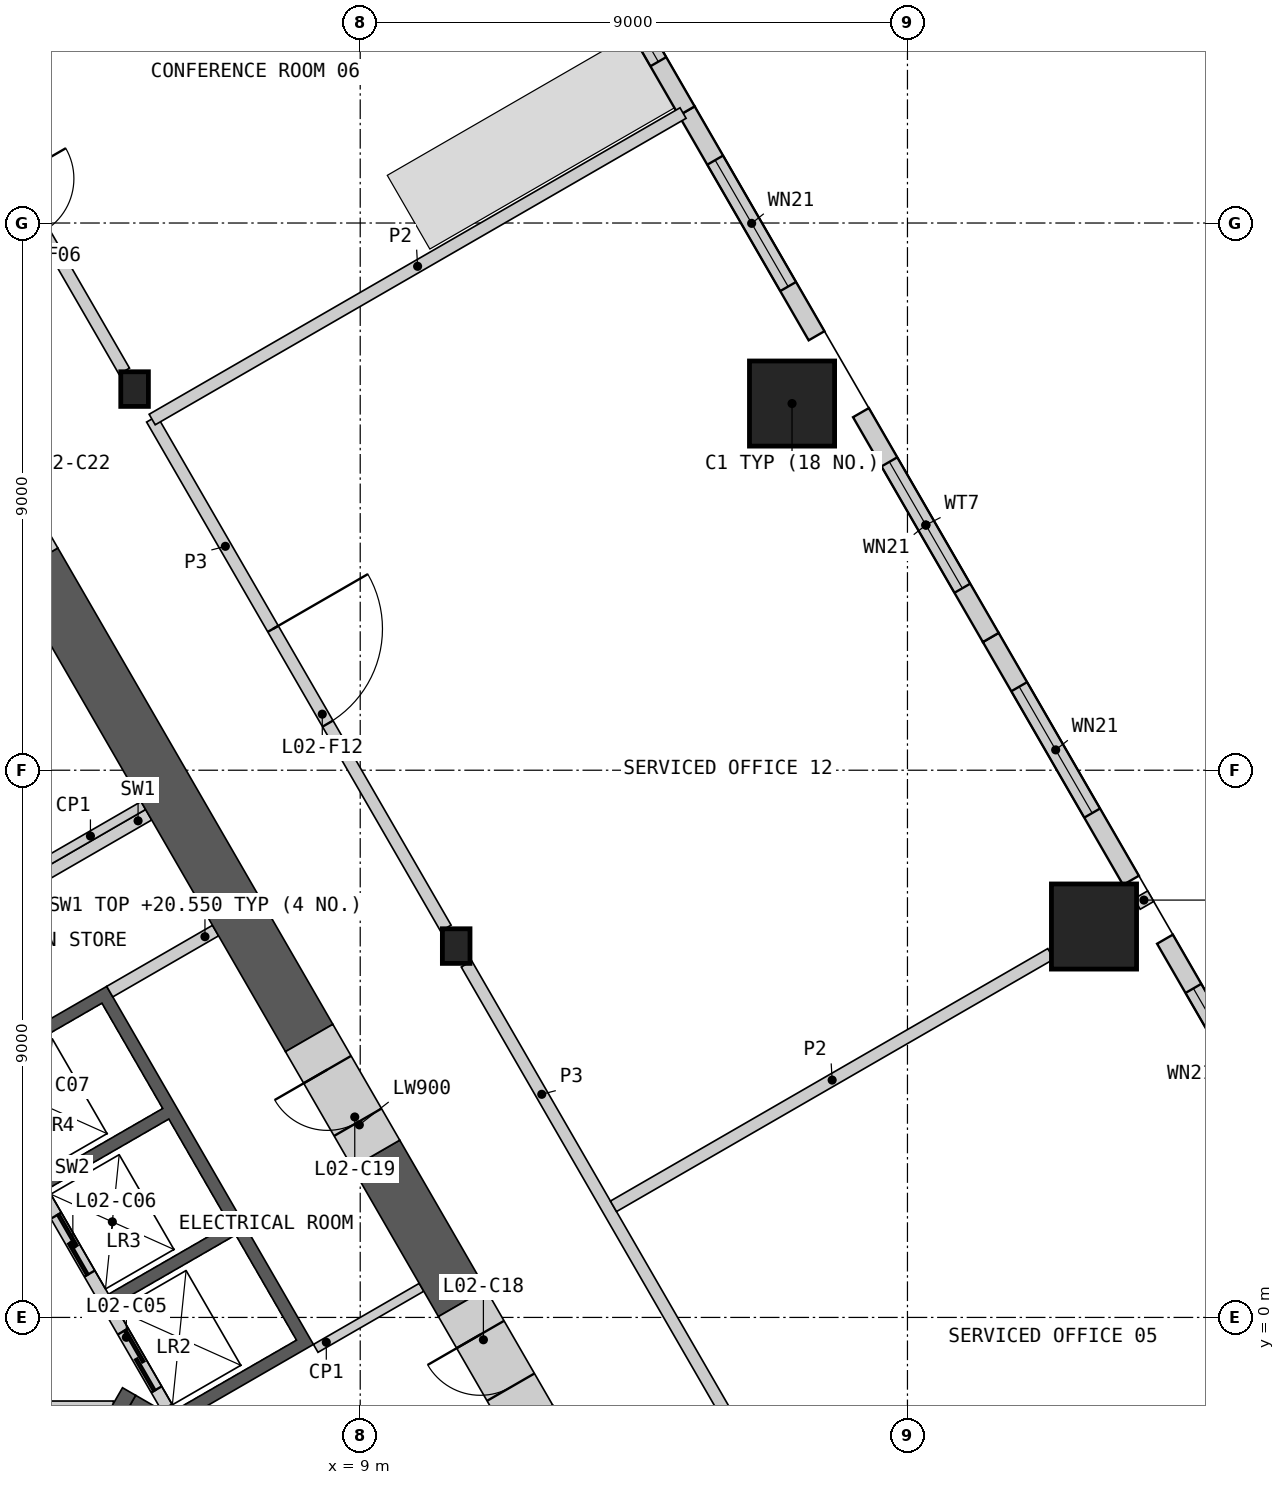
"""IFC4 building model, lengths in metres.
Left out: names, types, materials, properties, quantities, classifications, styles, units other than length and angle.
Written with IfcOpenShell. Run it as: python <this file> out.ifc"""

import sys

from ifc_helpers import new_model, si_unit, direction, frame, frame_2d, origin, origin_2d, place, context, subcontext, project, spatial, polyline, rectangle, hollow_rectangle, i_section, outline, extrude, element, fill, save


model = new_model("IFC4")
c1 = context("Model", 3, precision=1e-05, world=origin(), true_north=direction((0.0, 1.0)))
c2 = subcontext(c1, "Body", "Model", "MODEL_VIEW")
j1 = project(units=[si_unit("LENGTHUNIT", "METRE"), si_unit("PLANEANGLEUNIT", "RADIAN")], contexts=[c1])
p1 = place(None, origin())
s1 = spatial("IfcSite", under=j1, at=p1, CompositionType="ELEMENT")
p2 = place(p1, origin())
s2 = spatial("IfcBuilding", under=s1, at=p2, CompositionType="ELEMENT")
p3 = place(p2, frame((0.0, 0.0, 15.5)))
s3 = spatial("IfcBuildingStorey", under=s2, at=p3, CompositionType="ELEMENT", Elevation=15.5)
for number, where, z_axis, x_axis in (
    (1, (21.068, 6.429, 0.0), (0.0, 0.0, 1.0), (1.0, 0.0, 0.0)),
    (2, (16.102, 15.031, 0.0), (0.0, 0.0, 1.0), (1.0, 0.0, 0.0)),
):
    element("IfcColumn", number, at=place(p3, frame(where, z_axis=z_axis, x_axis=x_axis)), inside=s3, PredefinedType="COLUMN", context=c2, shape_type="SweptSolid", body=[
        extrude(hollow_rectangle(XDim=1.4, YDim=1.4, WallThickness=0.1, at=origin_2d()), origin(), (0.0, 0.0, 1.0), 5.5),
    ])
for number, where, z_axis, x_axis in (
    (3, (10.578, 6.107, 0.0), (0.0, 0.0, 1.0), (1.0, 0.0, 0.0)),
    (4, (5.289, 15.269, 0.0), (0.0, 0.0, 1.0), (1.0, 0.0, 0.0)),
):
    element("IfcColumn", number, at=place(p3, frame(where, z_axis=z_axis, x_axis=x_axis)), inside=s3, PredefinedType="COLUMN", context=c2, shape_type="SweptSolid", body=[
        extrude(i_section(OverallWidth=0.454, OverallDepth=0.57, WebThickness=0.078, FlangeThickness=0.125, at=origin_2d()), origin(), (0.0, 0.0, 1.0), 5.5),
    ])
p4 = place(p3, frame((24.37, 2.523, 0.0), z_axis=(0.0, 0.0, 1.0), x_axis=(-0.500019418418, 0.866014192265, 0.0)))
e5 = element("IfcWall", 5, at=p4, inside=s3, PredefinedType="SOLIDWALL", context=c2, shape_type="SweptSolid", body=[
    extrude(rectangle(XDim=4.27, YDim=0.3, at=frame_2d((2.135, 0.0))), origin(), (0.0, 0.0, 1.0), 5.05),
])
p5 = place(p4, frame((0.935, 0.0, 0.9)))
e6 = element("IfcOpeningElement", 6, at=p5, cuts=e5, PredefinedType="OPENING", context=c2, shape_type="SweptSolid", body=[
    extrude(rectangle(XDim=2.4, YDim=3.0, at=frame_2d((1.2, 1.5))), frame((0.0, 0.16, 0.0), z_axis=(0.0, -1.0, 0.0), x_axis=(1.0, 0.0, 0.0)), (0.0, 0.0, 1.0), 0.32),
])
p6 = place(p3, frame((21.676, 7.189, 0.0), z_axis=(0.0, 0.0, 1.0), x_axis=(-0.499982117899, 0.866035727774, 0.0)))
e7 = element("IfcWall", 7, at=p6, inside=s3, PredefinedType="SOLIDWALL", context=c2, shape_type="SweptSolid", body=[
    extrude(rectangle(XDim=4.612, YDim=0.3, at=frame_2d((2.306, 0.0))), origin(), (0.0, 0.0, 1.0), 5.05),
])
p7 = place(p6, frame((1.277, 0.0, 0.9)))
e8 = element("IfcOpeningElement", 8, at=p7, cuts=e7, PredefinedType="OPENING", context=c2, shape_type="SweptSolid", body=[
    extrude(rectangle(XDim=2.4, YDim=3.0, at=frame_2d((1.2, 1.5))), frame((0.0, 0.16, 0.0), z_axis=(0.0, -1.0, 0.0), x_axis=(1.0, 0.0, 0.0)), (0.0, 0.0, 1.0), 0.32),
])
p8 = place(p3, frame((19.37, 11.183, 0.0), z_axis=(0.0, 0.0, 1.0), x_axis=(-0.499994660107, 0.866028486751, 0.0)))
e9 = element("IfcWall", 9, at=p8, inside=s3, PredefinedType="SOLIDWALL", context=c2, shape_type="SweptSolid", body=[
    extrude(rectangle(XDim=4.27, YDim=0.3, at=frame_2d((2.135, 0.0))), origin(), (0.0, 0.0, 1.0), 5.05),
])
p9 = place(p8, frame((0.935, 0.0, 0.9)))
e10 = element("IfcOpeningElement", 10, at=p9, cuts=e9, PredefinedType="OPENING", context=c2, shape_type="SweptSolid", body=[
    extrude(rectangle(XDim=2.4, YDim=3.0, at=frame_2d((1.2, 1.5))), frame((0.0, 0.16, 0.0), z_axis=(0.0, -1.0, 0.0), x_axis=(1.0, 0.0, 0.0)), (0.0, 0.0, 1.0), 0.32),
])
p10 = place(p3, frame((16.505, 16.146, 0.0), z_axis=(0.0, 0.0, 1.0), x_axis=(-0.500019418418, 0.866014192265, 0.0)))
e11 = element("IfcWall", 11, at=p10, inside=s3, PredefinedType="SOLIDWALL", context=c2, shape_type="SweptSolid", body=[
    extrude(rectangle(XDim=4.27, YDim=0.3, at=frame_2d((2.135, 0.0))), origin(), (0.0, 0.0, 1.0), 5.05),
])
p11 = place(p10, frame((0.935, 0.0, 0.9)))
e12 = element("IfcOpeningElement", 12, at=p11, cuts=e11, PredefinedType="OPENING", context=c2, shape_type="SweptSolid", body=[
    extrude(rectangle(XDim=2.4, YDim=3.0, at=frame_2d((1.2, 1.5))), frame((0.0, 0.16, 0.0), z_axis=(0.0, -1.0, 0.0), x_axis=(1.0, 0.0, 0.0)), (0.0, 0.0, 1.0), 0.32),
])
p12 = place(p3, frame((14.37, 19.844, 0.0), z_axis=(0.0, 0.0, 1.0), x_axis=(-0.499994660107, 0.866028486751, 0.0)))
e13 = element("IfcWall", 13, at=p12, inside=s3, PredefinedType="SOLIDWALL", context=c2, shape_type="SweptSolid", body=[
    extrude(rectangle(XDim=4.27, YDim=0.3, at=frame_2d((2.135, 0.0))), origin(), (0.0, 0.0, 1.0), 5.05),
])
p13 = place(p12, frame((0.935, 0.0, 0.9)))
e14 = element("IfcOpeningElement", 14, at=p13, cuts=e13, PredefinedType="OPENING", context=c2, shape_type="SweptSolid", body=[
    extrude(rectangle(XDim=2.4, YDim=3.0, at=frame_2d((1.2, 1.5))), frame((0.0, 0.16, 0.0), z_axis=(0.0, -1.0, 0.0), x_axis=(1.0, 0.0, 0.0)), (0.0, 0.0, 1.0), 0.32),
])
p14 = place(p3, origin())
e15 = element("IfcWall", 15, at=p14, inside=s3, PredefinedType="SHEAR", context=c2, shape_type="SweptSolid", body=[
    extrude(outline(polyline([(2.66, 4.192), (4.831, 5.445), (8.231, -0.444), (6.061, -1.697), (5.96, -1.524), (7.952, -0.374), (6.952, 1.358), (4.96, 0.208), (4.861, 0.381), (6.852, 1.531), (5.852, 3.263), (3.861, 2.113), (3.76, 2.287), (5.752, 3.437), (4.752, 5.169), (2.76, 4.019), (2.66, 4.192)])), origin(), (0.0, 0.0, 1.0), 5.05),
])
p15 = place(p3, frame((5.817, -1.476, 0.0), z_axis=(0.0, 0.0, 1.0), x_axis=(-0.500002616675, 0.866023893041, 0.0)))
e16 = element("IfcWall", 16, at=p15, inside=s3, PredefinedType="SOLIDWALL", context=c2, shape_type="SweptSolid", body=[
    extrude(rectangle(XDim=8.373, YDim=0.2, at=frame_2d((4.187, 0.0))), origin(), (0.0, 0.0, 1.0), 5.05),
])
p16 = place(p15, frame((0.337, 0.0, 0.0)))
e17 = element("IfcOpeningElement", 17, at=p16, cuts=e16, PredefinedType="OPENING", context=c2, shape_type="SweptSolid", body=[
    extrude(rectangle(XDim=1.1, YDim=2.1, at=frame_2d((0.55, 1.05))), frame((0.0, 0.11, 0.0), z_axis=(0.0, -1.0, 0.0), x_axis=(1.0, 0.0, 0.0)), (0.0, 0.0, 1.0), 0.22),
])
p17 = place(p15, frame((2.537, 0.0, 0.0)))
e18 = element("IfcOpeningElement", 18, at=p17, cuts=e16, PredefinedType="OPENING", context=c2, shape_type="SweptSolid", body=[
    extrude(rectangle(XDim=1.1, YDim=2.1, at=frame_2d((0.55, 1.05))), frame((0.0, 0.11, 0.0), z_axis=(0.0, -1.0, 0.0), x_axis=(1.0, 0.0, 0.0)), (0.0, 0.0, 1.0), 0.22),
])
p18 = place(p15, frame((4.737, 0.0, 0.0)))
e19 = element("IfcOpeningElement", 19, at=p18, cuts=e16, PredefinedType="OPENING", context=c2, shape_type="SweptSolid", body=[
    extrude(rectangle(XDim=1.1, YDim=2.1, at=frame_2d((0.55, 1.05))), frame((0.0, 0.11, 0.0), z_axis=(0.0, -1.0, 0.0), x_axis=(1.0, 0.0, 0.0)), (0.0, 0.0, 1.0), 0.22),
])
p19 = place(p15, frame((7.037, 0.0, 0.0)))
e20 = element("IfcOpeningElement", 20, at=p19, cuts=e16, PredefinedType="OPENING", context=c2, shape_type="SweptSolid", body=[
    extrude(rectangle(XDim=0.9, YDim=2.1, at=frame_2d((0.45, 1.05))), frame((0.0, 0.11, 0.0), z_axis=(0.0, -1.0, 0.0), x_axis=(1.0, 0.0, 0.0)), (0.0, 0.0, 1.0), 0.22),
])
p20 = place(p3, frame((4.881, 5.358, 0.0), z_axis=(0.0, 0.0, 1.0), x_axis=(0.866035824272, 0.499981950752, 0.0)))
e21 = element("IfcWall", 21, at=p20, inside=s3, PredefinedType="SHEAR", context=c2, shape_type="SweptSolid", body=[
    extrude(rectangle(XDim=2.009, YDim=0.2, at=frame_2d((1.004, 0.0))), origin(), (0.0, 0.0, 1.0), 5.05),
])
p21 = place(p3, frame((3.781, 7.263, 0.0), z_axis=(0.0, 0.0, 1.0), x_axis=(0.865983199114, 0.50007309351, 0.0)))
e22 = element("IfcWall", 22, at=p21, inside=s3, PredefinedType="SHEAR", context=c2, shape_type="SweptSolid", body=[
    extrude(rectangle(XDim=2.009, YDim=0.2, at=frame_2d((1.004, 0.0))), origin(), (0.0, 0.0, 1.0), 5.05),
])
p22 = place(p3, frame((-4.941, -1.45, 0.0), z_axis=(0.0, 0.0, 1.0), x_axis=(1.0, 0.0, 0.0)))
e23 = element("IfcWall", 23, at=p22, inside=s3, PredefinedType="PARTITIONING", context=c2, shape_type="SweptSolid", body=[
    extrude(rectangle(XDim=9.882, YDim=0.15, at=frame_2d((4.941, 0.0))), origin(), (0.0, 0.0, 1.0), 5.05),
])
p23 = place(p22, frame((4.391, 0.0, 0.0)))
e24 = element("IfcOpeningElement", 24, at=p23, cuts=e23, PredefinedType="OPENING", context=c2, shape_type="SweptSolid", body=[
    extrude(rectangle(XDim=1.1, YDim=2.1, at=frame_2d((0.55, 1.05))), frame((0.0, 0.085, 0.0), z_axis=(0.0, -1.0, 0.0), x_axis=(1.0, 0.0, 0.0)), (0.0, 0.0, 1.0), 0.17),
])
p24 = place(p3, origin())
e25 = element("IfcWall", 25, at=p24, inside=s3, PredefinedType="SHEAR", context=c2, shape_type="SweptSolid", body=[
    extrude(outline(polyline([(10.032, -4.298), (10.374, -4.206), (5.307, -1.281), (5.182, -1.498), (10.032, -4.298)])), origin(), (0.0, 0.0, 1.0), 5.05),
])
p25 = place(p3, frame((3.655, -3.893, 0.0), z_axis=(0.0, 0.0, 1.0), x_axis=(0.499982516597, 0.866035497597, 0.0)))
e26 = element("IfcWall", 26, at=p25, inside=s3, PredefinedType="SHEAR", context=c2, shape_type="SweptSolid", body=[
    extrude(rectangle(XDim=3.088, YDim=0.25, at=frame_2d((1.544, 0.0))), origin(), (0.0, 0.0, 1.0), 5.05),
])
p26 = place(p25, frame((0.994, 0.0, 0.0)))
e27 = element("IfcOpeningElement", 27, at=p26, cuts=e26, PredefinedType="OPENING", context=c2, shape_type="SweptSolid", body=[
    extrude(rectangle(XDim=1.1, YDim=2.1, at=frame_2d((0.55, 1.05))), frame((0.0, 0.135, 0.0), z_axis=(0.0, -1.0, 0.0), x_axis=(1.0, 0.0, 0.0)), (0.0, 0.0, 1.0), 0.27),
])
for number, where, z_axis, x_axis in (
    (28, (3.693, 7.415, 0.0), (0.0, 0.0, 1.0), (0.866, 0.5, 0.0)),
    (29, (8.268, -0.509, 0.0), (0.0, 0.0, 1.0), (0.866, 0.5, 0.0)),
):
    element("IfcWall", number, at=place(p3, frame(where, z_axis=z_axis, x_axis=x_axis)), inside=s3, PredefinedType="PARTITIONING", context=c2, shape_type="SweptSolid", body=[
        extrude(rectangle(XDim=2.009, YDim=0.15, at=frame_2d((1.004, 0.0))), origin(), (0.0, 0.0, 1.0), 5.05),
    ])
p27 = place(p3, frame((8.16, 4.596, 0.0), z_axis=(0.0, 0.0, 1.0), x_axis=(-0.500011374349, 0.866018836701, 0.0)))
e30 = element("IfcWall", 30, at=p27, inside=s3, PredefinedType="SHEAR", context=c2, shape_type="SweptSolid", body=[
    extrude(rectangle(XDim=9.046, YDim=0.9, at=frame_2d((4.523, 0.0))), origin(), (0.0, 0.0, 1.0), 5.05),
])
p28 = place(p3, frame((15.831, -8.69, 0.0), z_axis=(0.0, 0.0, 1.0), x_axis=(-0.499995201193, 0.866028174359, 0.0)))
e31 = element("IfcWall", 31, at=p28, inside=s3, PredefinedType="SHEAR", context=c2, shape_type="SweptSolid", body=[
    extrude(rectangle(XDim=8.11, YDim=0.9, at=frame_2d((4.055, 0.0))), origin(), (0.0, 0.0, 1.0), 5.05),
])
p29 = place(p3, frame((10.676, 0.239, 0.0), z_axis=(0.0, 0.0, 1.0), x_axis=(-0.499978737809, 0.866037679168, 0.0)))
e32 = element("IfcWall", 32, at=p29, inside=s3, PredefinedType="SHEAR", context=c2, shape_type="SweptSolid", body=[
    extrude(rectangle(XDim=2.831, YDim=0.9, at=frame_2d((1.416, 0.0))), origin(), (0.0, 0.0, 1.0), 5.05),
])
p30 = place(p3, frame((11.776, -1.667, 0.0), z_axis=(0.0, 0.0, 1.0), x_axis=(-0.50002983664, 0.866008176907, 0.0)))
e33 = element("IfcWall", 33, at=p30, inside=s3, PredefinedType="SHEAR", context=c2, shape_type="SweptSolid", body=[
    extrude(rectangle(XDim=2.2, YDim=0.9, at=frame_2d((1.1, 0.0))), origin(), (0.0, 0.0, 1.0), 5.05),
])
p31 = place(p30, frame((0.6, 0.0, 0.0)))
e34 = element("IfcOpeningElement", 34, at=p31, cuts=e33, PredefinedType="OPENING", context=c2, shape_type="SweptSolid", body=[
    extrude(rectangle(XDim=1.0, YDim=2.1, at=frame_2d((0.5, 1.05))), frame((0.0, 0.46, 0.0), z_axis=(0.0, -1.0, 0.0), x_axis=(1.0, 0.0, 0.0)), (0.0, 0.0, 1.0), 0.92),
])
p32 = place(p3, frame((9.26, 2.691, 0.0), z_axis=(0.0, 0.0, 1.0), x_axis=(-0.499946605688, 0.86605622881, 0.0)))
e35 = element("IfcWall", 35, at=p32, inside=s3, PredefinedType="SHEAR", context=c2, shape_type="SweptSolid", body=[
    extrude(rectangle(XDim=2.2, YDim=0.9, at=frame_2d((1.1, 0.0))), origin(), (0.0, 0.0, 1.0), 5.05),
])
p33 = place(p32, frame((0.6, 0.0, 0.0)))
e36 = element("IfcOpeningElement", 36, at=p33, cuts=e35, PredefinedType="OPENING", context=c2, shape_type="SweptSolid", body=[
    extrude(rectangle(XDim=1.0, YDim=2.1, at=frame_2d((0.5, 1.05))), frame((0.0, 0.46, 0.0), z_axis=(0.0, -1.0, 0.0), x_axis=(1.0, 0.0, 0.0)), (0.0, 0.0, 1.0), 0.92),
])
p34 = place(p3, frame((3.637, 12.43, 0.0), z_axis=(0.0, 0.0, 1.0), x_axis=(-0.499994660107, 0.866028486751, 0.0)))
e37 = element("IfcWall", 37, at=p34, inside=s3, PredefinedType="SHEAR", context=c2, shape_type="SweptSolid", body=[
    extrude(rectangle(XDim=2.2, YDim=0.9, at=frame_2d((1.1, 0.0))), origin(), (0.0, 0.0, 1.0), 5.05),
])
p35 = place(p34, frame((0.6, 0.0, 0.0)))
e38 = element("IfcOpeningElement", 38, at=p35, cuts=e37, PredefinedType="OPENING", context=c2, shape_type="SweptSolid", body=[
    extrude(rectangle(XDim=1.0, YDim=2.1, at=frame_2d((0.5, 1.05))), frame((0.0, 0.46, 0.0), z_axis=(0.0, -1.0, 0.0), x_axis=(1.0, 0.0, 0.0)), (0.0, 0.0, 1.0), 0.92),
])
p36 = place(p3, frame((10.749, 5.813, 0.0), z_axis=(0.0, 0.0, 1.0), x_axis=(0.500004292778, -0.866022925334, 0.0)))
e39 = element("IfcWall", 39, at=p36, inside=s3, PredefinedType="PARTITIONING", context=c2, shape_type="SweptSolid", body=[
    extrude(rectangle(XDim=9.898, YDim=0.2, at=frame_2d((4.949, 0.0))), origin(), (0.0, 0.0, 1.0), 5.05),
])
p37 = place(p3, frame((5.573, 14.776, 0.0), z_axis=(0.0, 0.0, 1.0), x_axis=(0.499986904098, -0.866032964575, 0.0)))
e40 = element("IfcWall", 40, at=p37, inside=s3, PredefinedType="PARTITIONING", context=c2, shape_type="SweptSolid", body=[
    extrude(rectangle(XDim=9.67, YDim=0.2, at=frame_2d((4.835, 0.0))), origin(), (0.0, 0.0, 1.0), 5.05),
])
p38 = place(p37, frame((3.985, 0.0, 0.0)))
e41 = element("IfcOpeningElement", 41, at=p38, cuts=e40, PredefinedType="OPENING", context=c2, shape_type="SweptSolid", body=[
    extrude(rectangle(XDim=1.8, YDim=2.1, at=frame_2d((0.9, 1.05))), frame((0.0, 0.11, 0.0), z_axis=(0.0, -1.0, 0.0), x_axis=(1.0, 0.0, 0.0)), (0.0, 0.0, 1.0), 0.22),
])
p39 = place(p3, frame((1.913, 21.116, 0.0), z_axis=(0.0, 0.0, 1.0), x_axis=(0.500004801114, -0.866022631842, 0.0)))
e42 = element("IfcWall", 42, at=p39, inside=s3, PredefinedType="PARTITIONING", context=c2, shape_type="SweptSolid", body=[
    extrude(rectangle(XDim=6.412, YDim=0.2, at=frame_2d((3.206, 0.0))), origin(), (0.0, 0.0, 1.0), 5.05),
])
p40 = place(p39, frame((2.756, 0.0, 0.0)))
e43 = element("IfcOpeningElement", 43, at=p40, cuts=e42, PredefinedType="OPENING", context=c2, shape_type="SweptSolid", body=[
    extrude(rectangle(XDim=1.0, YDim=2.1, at=frame_2d((0.5, 1.05))), frame((0.0, 0.11, 0.0), z_axis=(0.0, -1.0, 0.0), x_axis=(1.0, 0.0, 0.0)), (0.0, 0.0, 1.0), 0.22),
])
p41 = place(p3, frame((5.579, 14.768, 0.0), z_axis=(0.0, 0.0, 1.0), x_axis=(0.866017018378, 0.500014523669, 0.0)))
e44 = element("IfcWall", 44, at=p41, inside=s3, PredefinedType="PARTITIONING", context=c2, shape_type="SweptSolid", body=[
    extrude(rectangle(XDim=10.082, YDim=0.2, at=frame_2d((5.041, 0.0))), origin(), (0.0, 0.0, 1.0), 5.05),
])
p42 = place(p3, frame((13.165, 1.827, 0.0), z_axis=(0.0, 0.0, 1.0), x_axis=(0.866036778076, 0.499980298632, 0.0)))
e45 = element("IfcWall", 45, at=p42, inside=s3, PredefinedType="PARTITIONING", context=c2, shape_type="SweptSolid", body=[
    extrude(rectangle(XDim=8.305, YDim=0.2, at=frame_2d((4.153, 0.0))), origin(), (0.0, 0.0, 1.0), 5.05),
])
p43 = place(p3, frame((21.778, 6.8, 0.0), z_axis=(0.0, 0.0, 1.0), x_axis=(0.866185586049, 0.49972245349, 0.0)))
e46 = element("IfcWall", 46, at=p43, inside=s3, PredefinedType="PARTITIONING", context=c2, shape_type="SweptSolid", body=[
    extrude(rectangle(XDim=0.257, YDim=0.2, at=frame_2d((0.128, 0.0))), origin(), (0.0, 0.0, 1.0), 5.05),
])
p44 = place(p5, origin())
e47 = element("IfcWindow", 47, at=p44, inside=s3, PartitioningType="SINGLE_PANEL", PredefinedType="WINDOW", context=c2, shape_type="SweptSolid", body=[
    extrude(rectangle(XDim=2.4, YDim=3.0, at=frame_2d((1.2, 1.5))), frame((0.0, 0.03, 0.0), z_axis=(0.0, -1.0, 0.0), x_axis=(1.0, 0.0, 0.0)), (0.0, 0.0, 1.0), 0.06),
])
fill(e6, e47)
p45 = place(p7, origin())
e48 = element("IfcWindow", 48, at=p45, inside=s3, PartitioningType="SINGLE_PANEL", PredefinedType="WINDOW", context=c2, shape_type="SweptSolid", body=[
    extrude(rectangle(XDim=2.4, YDim=3.0, at=frame_2d((1.2, 1.5))), frame((0.0, 0.03, 0.0), z_axis=(0.0, -1.0, 0.0), x_axis=(1.0, 0.0, 0.0)), (0.0, 0.0, 1.0), 0.06),
])
fill(e8, e48)
p46 = place(p9, origin())
e49 = element("IfcWindow", 49, at=p46, inside=s3, PartitioningType="SINGLE_PANEL", PredefinedType="WINDOW", context=c2, shape_type="SweptSolid", body=[
    extrude(rectangle(XDim=2.4, YDim=3.0, at=frame_2d((1.2, 1.5))), frame((0.0, 0.03, 0.0), z_axis=(0.0, -1.0, 0.0), x_axis=(1.0, 0.0, 0.0)), (0.0, 0.0, 1.0), 0.06),
])
fill(e10, e49)
p47 = place(p11, origin())
e50 = element("IfcWindow", 50, at=p47, inside=s3, PartitioningType="SINGLE_PANEL", PredefinedType="WINDOW", context=c2, shape_type="SweptSolid", body=[
    extrude(rectangle(XDim=2.4, YDim=3.0, at=frame_2d((1.2, 1.5))), frame((0.0, 0.03, 0.0), z_axis=(0.0, -1.0, 0.0), x_axis=(1.0, 0.0, 0.0)), (0.0, 0.0, 1.0), 0.06),
])
fill(e12, e50)
p48 = place(p13, origin())
e51 = element("IfcWindow", 51, at=p48, inside=s3, PartitioningType="SINGLE_PANEL", PredefinedType="WINDOW", context=c2, shape_type="SweptSolid", body=[
    extrude(rectangle(XDim=2.4, YDim=3.0, at=frame_2d((1.2, 1.5))), frame((0.0, 0.03, 0.0), z_axis=(0.0, -1.0, 0.0), x_axis=(1.0, 0.0, 0.0)), (0.0, 0.0, 1.0), 0.06),
])
fill(e14, e51)
p49 = place(p16, origin())
e52 = element("IfcDoor", 52, at=p49, inside=s3, OperationType="SLIDING_TO_LEFT", PredefinedType="DOOR", context=c2, shape_type="SweptSolid", body=[
    extrude(rectangle(XDim=1.1, YDim=2.1, at=frame_2d((0.55, 1.05))), frame((0.0, 0.025, 0.0), z_axis=(0.0, -1.0, 0.0), x_axis=(1.0, 0.0, 0.0)), (0.0, 0.0, 1.0), 0.05),
])
fill(e17, e52)
p50 = place(p17, origin())
e53 = element("IfcDoor", 53, at=p50, inside=s3, OperationType="SLIDING_TO_LEFT", PredefinedType="DOOR", context=c2, shape_type="SweptSolid", body=[
    extrude(rectangle(XDim=1.1, YDim=2.1, at=frame_2d((0.55, 1.05))), frame((0.0, 0.025, 0.0), z_axis=(0.0, -1.0, 0.0), x_axis=(1.0, 0.0, 0.0)), (0.0, 0.0, 1.0), 0.05),
])
fill(e18, e53)
p51 = place(p31, origin())
e54 = element("IfcDoor", 54, at=p51, inside=s3, OperationType="SINGLE_SWING_RIGHT", PredefinedType="DOOR", context=c2, shape_type="SweptSolid", body=[
    extrude(rectangle(XDim=1.0, YDim=2.1, at=frame_2d((0.5, 1.05))), frame((0.0, 0.205, 0.0), z_axis=(0.0, -1.0, 0.0), x_axis=(1.0, 0.0, 0.0)), (0.0, 0.0, 1.0), 0.05),
])
fill(e34, e54)
p52 = place(p33, origin())
e55 = element("IfcDoor", 55, at=p52, inside=s3, OperationType="SINGLE_SWING_RIGHT", PredefinedType="DOOR", context=c2, shape_type="SweptSolid", body=[
    extrude(rectangle(XDim=1.0, YDim=2.1, at=frame_2d((0.5, 1.05))), frame((0.0, 0.205, 0.0), z_axis=(0.0, -1.0, 0.0), x_axis=(1.0, 0.0, 0.0)), (0.0, 0.0, 1.0), 0.05),
])
fill(e36, e55)
p53 = place(p38, origin())
e56 = element("IfcDoor", 56, at=p53, inside=s3, OperationType="DOUBLE_DOOR_SINGLE_SWING", PredefinedType="DOOR", context=c2, shape_type="SweptSolid", body=[
    extrude(rectangle(XDim=1.8, YDim=2.1, at=frame_2d((0.9, 1.05))), frame((0.0, 0.025, 0.0), z_axis=(0.0, -1.0, 0.0), x_axis=(1.0, 0.0, 0.0)), (0.0, 0.0, 1.0), 0.05),
])
fill(e41, e56)
save(model, sys.argv[1])
